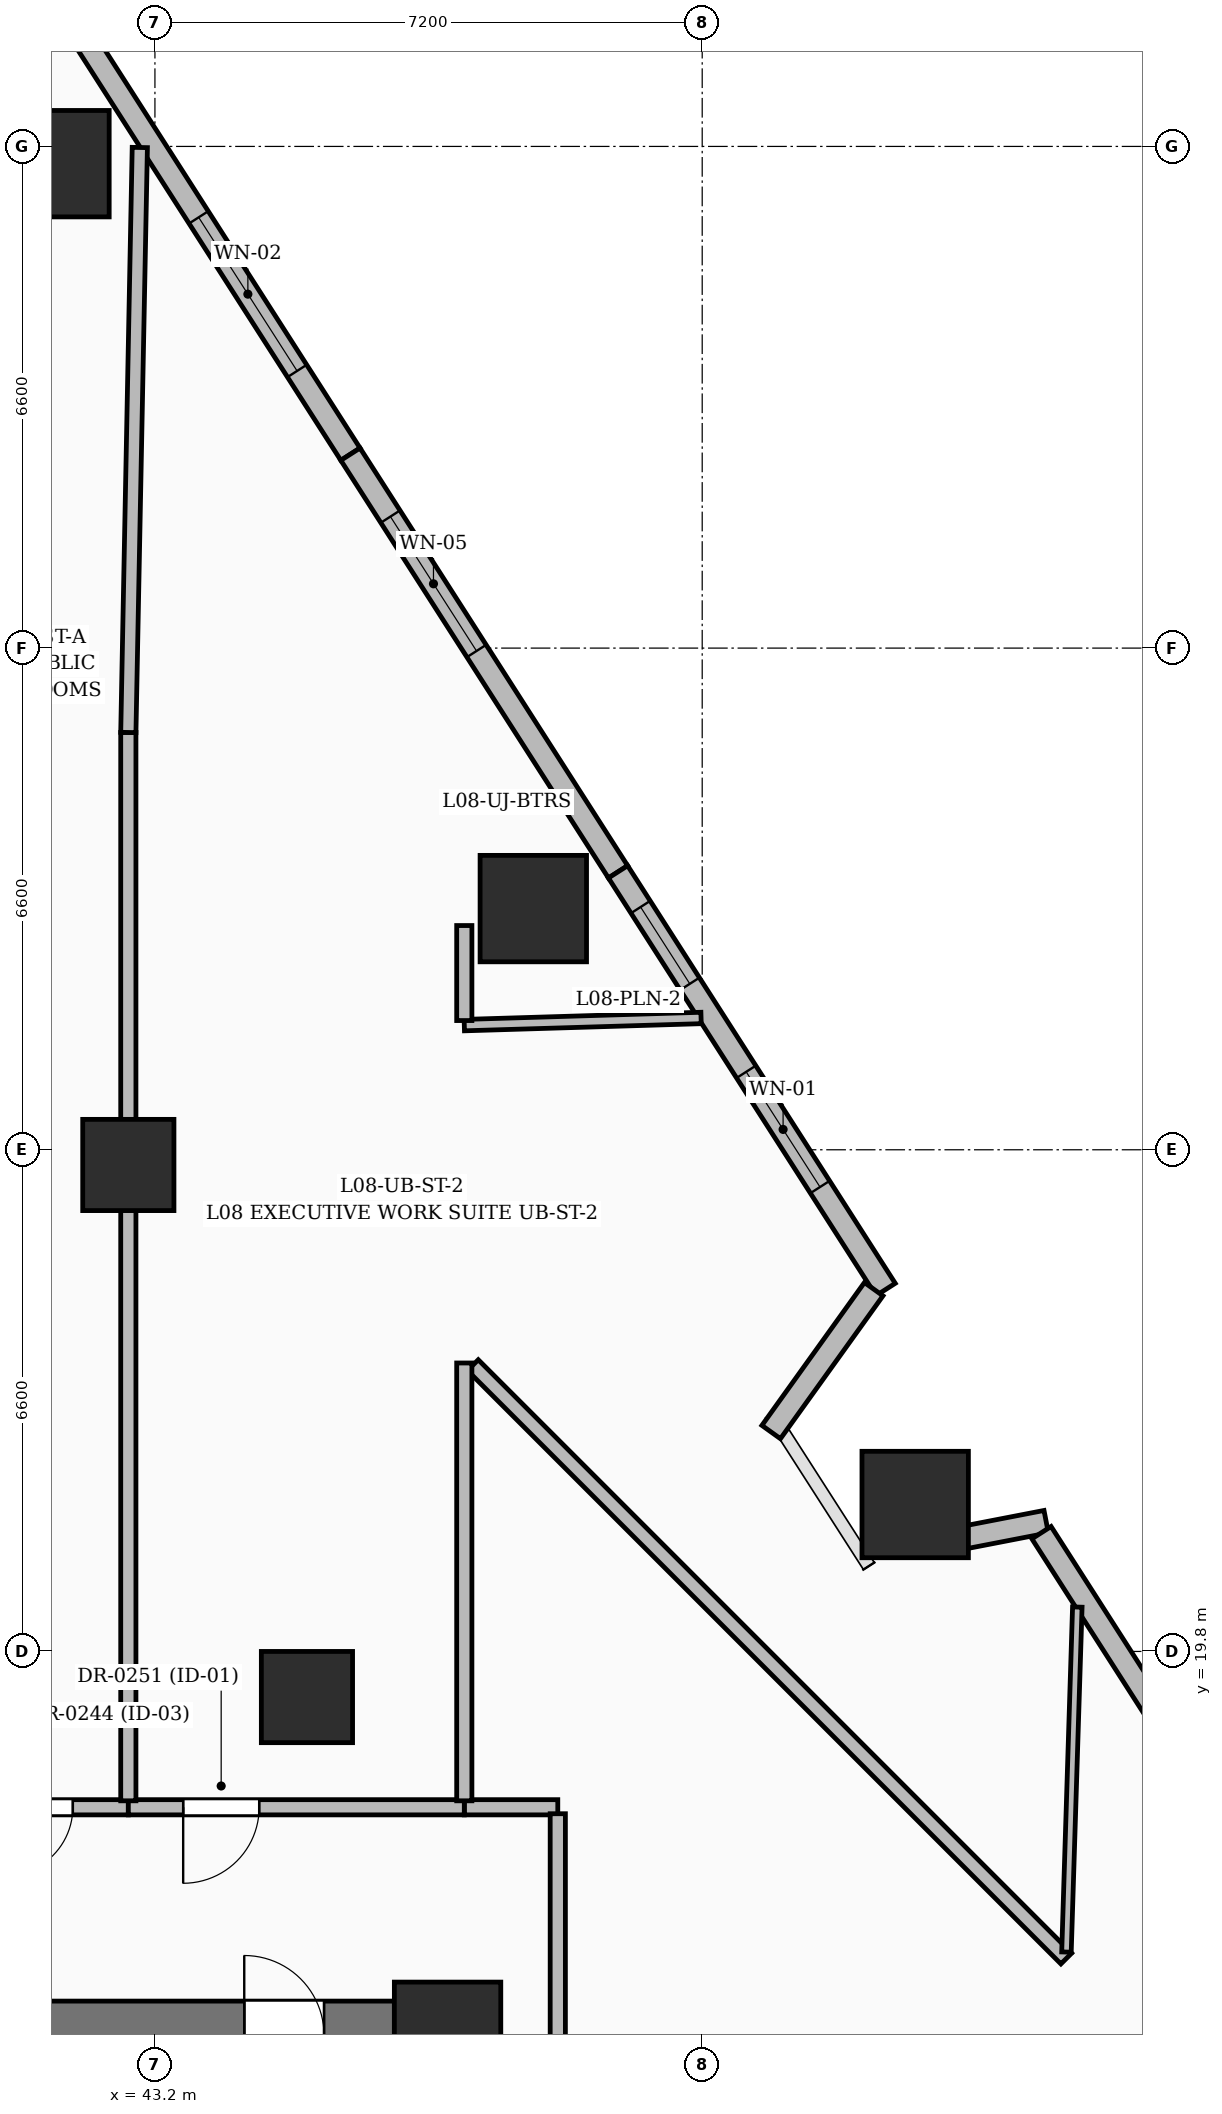
"""IFC4 building model, lengths in metres.
Left out: names, types, materials, properties, quantities, classifications, styles, units other than length and angle.
Written with IfcOpenShell. Run it as: python <this file> out.ifc"""

import sys

from ifc_helpers import new_model, si_unit, direction, frame, frame_2d, origin, origin_2d, place, context, subcontext, project, spatial, rectangle, extrude, element, fill, save


model = new_model("IFC4")
c1 = context("Model", 3, precision=1e-05, world=origin(), true_north=direction((0.0, 1.0)))
c2 = subcontext(c1, "Body", "Model", "MODEL_VIEW")
j1 = project(units=[si_unit("LENGTHUNIT", "METRE"), si_unit("PLANEANGLEUNIT", "RADIAN")], contexts=[c1])
p1 = place(None, origin())
s1 = spatial("IfcSite", under=j1, at=p1, CompositionType="ELEMENT")
p2 = place(p1, origin())
s2 = spatial("IfcBuilding", under=s1, at=p2, CompositionType="ELEMENT")
p3 = place(p2, frame((0.0, 0.0, 39.0)))
s3 = spatial("IfcBuildingStorey", under=s2, at=p3, CompositionType="ELEMENT", Elevation=39.0)
p4 = place(p3, frame((47.05, 14.75, 0.0), z_axis=(0.0, 0.0, 1.0), x_axis=(1.0, 0.0, 0.0)))
e1 = element("IfcColumn", 1, at=p4, inside=s3, PredefinedType="COLUMN", context=c2, shape_type="SweptSolid", body=[
    extrude(rectangle(XDim=1.4, YDim=1.4, at=origin_2d()), origin(), (0.0, 0.0, 1.0), 3.6),
])
for number, where, z_axis, x_axis in (
    (2, (45.2, 19.2, 0.0), (0.0, 0.0, 1.0), (1.0, 0.0, 0.0)),
    (3, (42.85, 26.2, 0.0), (0.0, 0.0, 1.0), (1.0, 0.0, 0.0)),
):
    element("IfcColumn", number, at=place(p3, frame(where, z_axis=z_axis, x_axis=x_axis)), inside=s3, PredefinedType="COLUMN", context=c2, shape_type="SweptSolid", body=[
        extrude(rectangle(XDim=1.2, YDim=1.2, at=origin_2d()), origin(), (0.0, 0.0, 1.0), 3.6),
    ])
p5 = place(p3, frame((35.85, 14.75, 0.0), z_axis=(0.0, 0.0, 1.0), x_axis=(1.0, 0.0, 0.0)))
e4 = element("IfcWall", 4, at=p5, inside=s3, PredefinedType="SHEAR", context=c2, shape_type="SweptSolid", body=[
    extrude(rectangle(XDim=10.5, YDim=0.9, at=frame_2d((5.25, 0.0))), origin(), (0.0, 0.0, 1.0), 3.6),
])
p6 = place(p5, frame((0.925, 0.0, 0.0)))
e5 = element("IfcOpeningElement", 5, at=p6, cuts=e4, PredefinedType="OPENING", context=c2, shape_type="SweptSolid", body=[
    extrude(rectangle(XDim=1.05, YDim=2.15, at=frame_2d((0.525, 1.075))), frame((0.0, 0.46, 0.0), z_axis=(0.0, -1.0, 0.0), x_axis=(1.0, 0.0, 0.0)), (0.0, 0.0, 1.0), 0.92),
])
p7 = place(p5, frame((8.525, 0.0, 0.0)))
e6 = element("IfcOpeningElement", 6, at=p7, cuts=e4, PredefinedType="OPENING", context=c2, shape_type="SweptSolid", body=[
    extrude(rectangle(XDim=1.05, YDim=2.15, at=frame_2d((0.525, 1.075))), frame((0.0, 0.46, 0.0), z_axis=(0.0, -1.0, 0.0), x_axis=(1.0, 0.0, 0.0)), (0.0, 0.0, 1.0), 0.92),
])
for number, where, z_axis, x_axis in (
    (7, (53.202, 21.733, 0.0), (0.0, 0.0, 1.0), (1.0, 0.0, 0.0)),
    (8, (48.178, 29.573, 0.0), (0.0, 0.0, 1.0), (1.0, 0.0, 0.0)),
    (9, (41.898, 39.373, 0.0), (0.0, 0.0, 1.0), (1.0, 0.0, 0.0)),
):
    element("IfcColumn", number, at=place(p3, frame(where, z_axis=z_axis, x_axis=x_axis)), inside=s3, PredefinedType="COLUMN", context=c2, shape_type="SweptSolid", body=[
        extrude(rectangle(XDim=1.4, YDim=1.4, at=origin_2d()), origin(), (0.0, 0.0, 1.0), 3.6),
    ])
p8 = place(p3, frame((42.251, 41.045, 0.0), z_axis=(0.0, 0.0, 1.0), x_axis=(0.539526045631, -0.841968910403, 0.0)))
e10 = element("IfcWall", 10, at=p8, inside=s3, PredefinedType="SOLIDWALL", context=c2, shape_type="SweptSolid", body=[
    extrude(rectangle(XDim=6.526, YDim=0.3, at=frame_2d((3.263, 0.0))), origin(), (0.0, 0.0, 1.0), 3.35),
])
p9 = place(p8, frame((2.825, 0.0, 0.6)))
e11 = element("IfcOpeningElement", 11, at=p9, cuts=e10, PredefinedType="OPENING", context=c2, shape_type="SweptSolid", body=[
    extrude(rectangle(XDim=2.4, YDim=2.1, at=frame_2d((1.2, 1.05))), frame((0.0, 0.16, 0.0), z_axis=(0.0, -1.0, 0.0), x_axis=(1.0, 0.0, 0.0)), (0.0, 0.0, 1.0), 0.32),
])
p10 = place(p3, frame((45.772, 35.551, 0.0), z_axis=(0.0, 0.0, 1.0), x_axis=(0.539526045631, -0.841968910403, 0.0)))
e12 = element("IfcWall", 12, at=p10, inside=s3, PredefinedType="SOLIDWALL", context=c2, shape_type="SweptSolid", body=[
    extrude(rectangle(XDim=6.526, YDim=0.3, at=frame_2d((3.263, 0.0))), origin(), (0.0, 0.0, 1.0), 3.35),
])
p11 = place(p10, frame((0.975, 0.0, 0.55)))
e13 = element("IfcOpeningElement", 13, at=p11, cuts=e12, PredefinedType="OPENING", context=c2, shape_type="SweptSolid", body=[
    extrude(rectangle(XDim=2.1, YDim=2.4, at=frame_2d((1.05, 1.2))), frame((0.0, 0.16, 0.0), z_axis=(0.0, -1.0, 0.0), x_axis=(1.0, 0.0, 0.0)), (0.0, 0.0, 1.0), 0.32),
])
p12 = place(p3, frame((49.293, 30.057, 0.0), z_axis=(0.0, 0.0, 1.0), x_axis=(0.539509050887, -0.84197980024, 0.0)))
e14 = element("IfcWall", 14, at=p12, inside=s3, PredefinedType="SOLIDWALL", context=c2, shape_type="SweptSolid", body=[
    extrude(rectangle(XDim=6.526, YDim=0.3, at=frame_2d((3.263, 0.0))), origin(), (0.0, 0.0, 1.0), 3.35),
])
p13 = place(p12, frame((3.125, 0.0, 0.6)))
e15 = element("IfcOpeningElement", 15, at=p13, cuts=e14, PredefinedType="OPENING", context=c2, shape_type="SweptSolid", body=[
    extrude(rectangle(XDim=1.8, YDim=2.1, at=frame_2d((0.9, 1.05))), frame((0.0, 0.16, 0.0), z_axis=(0.0, -1.0, 0.0), x_axis=(1.0, 0.0, 0.0)), (0.0, 0.0, 1.0), 0.32),
])
p14 = place(p12, frame((0.55, 0.0, 0.8)))
e16 = element("IfcOpeningElement", 16, at=p14, cuts=e14, PredefinedType="OPENING", context=c2, shape_type="SweptSolid", body=[
    extrude(rectangle(XDim=1.2, YDim=1.8, at=frame_2d((0.6, 0.9))), frame((0.0, 0.16, 0.0), z_axis=(0.0, -1.0, 0.0), x_axis=(1.0, 0.0, 0.0)), (0.0, 0.0, 1.0), 0.32),
])
p15 = place(p3, frame((52.656, 24.566, 0.0), z_axis=(0.0, 0.0, 1.0), x_axis=(-0.583053244013, -0.812433944789, 0.0)))
e17 = element("IfcWall", 17, at=p15, inside=s3, PredefinedType="SOLIDWALL", context=c2, shape_type="SweptSolid", body=[
    extrude(rectangle(XDim=2.314, YDim=0.3, at=frame_2d((1.157, 0.0))), origin(), (0.0, 0.0, 1.0), 2.375),
])
p16 = place(p3, frame((53.864, 21.302, 0.0), z_axis=(0.0, 0.0, 1.0), x_axis=(0.981752657473, 0.190162350493, 0.0)))
e18 = element("IfcWall", 18, at=p16, inside=s3, PredefinedType="SOLIDWALL", context=c2, shape_type="SweptSolid", body=[
    extrude(rectangle(XDim=1.081, YDim=0.3, at=frame_2d((0.541, 0.0))), origin(), (0.0, 0.0, 1.0), 2.375),
])
p17 = place(p3, frame((54.864, 21.363, 0.0), z_axis=(0.0, 0.0, 1.0), x_axis=(0.539525561028, -0.841969220932, 0.0)))
e19 = element("IfcWall", 19, at=p17, inside=s3, PredefinedType="SOLIDWALL", context=c2, shape_type="SweptSolid", body=[
    extrude(rectangle(XDim=5.872, YDim=0.3, at=frame_2d((2.936, 0.0))), origin(), (0.0, 0.0, 1.0), 3.35),
])
p18 = place(p17, frame((2.895, 0.0, 0.8)))
e20 = element("IfcOpeningElement", 20, at=p18, cuts=e19, PredefinedType="OPENING", context=c2, shape_type="SweptSolid", body=[
    extrude(rectangle(XDim=1.2, YDim=1.8, at=frame_2d((0.6, 0.9))), frame((0.0, 0.16, 0.0), z_axis=(0.0, -1.0, 0.0), x_axis=(1.0, 0.0, 0.0)), (0.0, 0.0, 1.0), 0.32),
])
p19 = place(p3, frame((48.5, 17.75, 0.0), z_axis=(0.0, 0.0, 1.0), x_axis=(-1.0, 0.0, 0.0)))
e21 = element("IfcWall", 21, at=p19, inside=s3, PredefinedType="PARTITIONING", context=c2, shape_type="SweptSolid", body=[
    extrude(rectangle(XDim=1.23, YDim=0.2, at=frame_2d((0.615, 0.0))), origin(), (0.0, 0.0, 1.0), 2.771),
])
p20 = place(p3, frame((42.85, 17.75, 0.0), z_axis=(0.0, 0.0, 1.0), x_axis=(-1.0, 0.0, 0.0)))
e22 = element("IfcWall", 22, at=p20, inside=s3, PredefinedType="PARTITIONING", context=c2, shape_type="SweptSolid", body=[
    extrude(rectangle(XDim=2.36, YDim=0.2, at=frame_2d((1.18, 0.0))), origin(), (0.0, 0.0, 1.0), 3.35),
])
p21 = place(p20, frame((0.73, 0.0, 0.0)))
e23 = element("IfcOpeningElement", 23, at=p21, cuts=e22, PredefinedType="OPENING", context=c2, shape_type="SweptSolid", body=[
    extrude(rectangle(XDim=0.9, YDim=2.1, at=frame_2d((0.45, 1.05))), frame((0.0, 0.11, 0.0), z_axis=(0.0, -1.0, 0.0), x_axis=(1.0, 0.0, 0.0)), (0.0, 0.0, 1.0), 0.22),
])
p22 = place(p3, frame((47.27, 17.75, 0.0), z_axis=(0.0, 0.0, 1.0), x_axis=(-1.0, 0.0, 0.0)))
e24 = element("IfcWall", 24, at=p22, inside=s3, PredefinedType="PARTITIONING", context=c2, shape_type="SweptSolid", body=[
    extrude(rectangle(XDim=4.42, YDim=0.2, at=frame_2d((2.21, 0.0))), origin(), (0.0, 0.0, 1.0), 2.309),
])
p23 = place(p22, frame((2.698, 0.0, 0.0)))
e25 = element("IfcOpeningElement", 25, at=p23, cuts=e24, PredefinedType="OPENING", context=c2, shape_type="SweptSolid", body=[
    extrude(rectangle(XDim=1.0, YDim=2.2, at=frame_2d((0.5, 1.1))), frame((0.0, 0.11, 0.0), z_axis=(0.0, -1.0, 0.0), x_axis=(1.0, 0.0, 0.0)), (0.0, 0.0, 1.0), 0.22),
])
p24 = place(p3, frame((55.19, 15.76, 0.0), z_axis=(0.0, 0.0, 1.0), x_axis=(-0.707106781187, 0.707106781187, 0.0)))
e26 = element("IfcWall", 26, at=p24, inside=s3, PredefinedType="PARTITIONING", context=c2, shape_type="SweptSolid", body=[
    extrude(rectangle(XDim=11.041, YDim=0.2, at=frame_2d((5.52, 0.0))), origin(), (0.0, 0.0, 1.0), 2.279),
])
p25 = place(p3, frame((47.27, 23.595, 0.0), z_axis=(0.0, 0.0, 1.0), x_axis=(0.0, -1.0, 0.0)))
e27 = element("IfcWall", 27, at=p25, inside=s3, PredefinedType="PARTITIONING", context=c2, shape_type="SweptSolid", body=[
    extrude(rectangle(XDim=5.76, YDim=0.2, at=frame_2d((2.88, 0.0))), origin(), (0.0, 0.0, 1.0), 2.771),
])
p26 = place(p3, frame((55.192, 15.845, 0.0), z_axis=(0.0, 0.0, 1.0), x_axis=(0.031449581736, 0.99950533956, 0.0)))
e28 = element("IfcWall", 28, at=p26, inside=s3, PredefinedType="PARTITIONING", context=c2, shape_type="SweptSolid", body=[
    extrude(rectangle(XDim=4.541, YDim=0.125, at=frame_2d((2.271, 0.0))), origin(), (0.0, 0.0, 1.0), 2.37),
])
p27 = place(p3, frame((50.385, 28.134, 0.0), z_axis=(0.0, 0.0, 1.0), x_axis=(-0.999545052024, -0.030161050633, 0.0)))
e29 = element("IfcWall", 29, at=p27, inside=s3, PredefinedType="PARTITIONING", context=c2, shape_type="SweptSolid", body=[
    extrude(rectangle(XDim=3.116, YDim=0.15, at=frame_2d((1.558, 0.0))), origin(), (0.0, 0.0, 1.0), 2.279),
])
p28 = place(p3, frame((47.27, 29.35, 0.0), z_axis=(0.0, 0.0, 1.0), x_axis=(0.0, -1.0, 0.0)))
e30 = element("IfcWall", 30, at=p28, inside=s3, PredefinedType="PARTITIONING", context=c2, shape_type="SweptSolid", body=[
    extrude(rectangle(XDim=1.25, YDim=0.2, at=frame_2d((0.625, 0.0))), origin(), (0.0, 0.0, 1.0), 3.35),
])
p29 = place(p3, frame((42.85, 17.835, 0.0), z_axis=(0.0, 0.0, 1.0), x_axis=(0.0, 1.0, 0.0)))
e31 = element("IfcWall", 31, at=p29, inside=s3, PredefinedType="PARTITIONING", context=c2, shape_type="SweptSolid", body=[
    extrude(rectangle(XDim=14.055, YDim=0.2, at=frame_2d((7.027, 0.0))), origin(), (0.0, 0.0, 1.0), 2.279),
])
p30 = place(p3, frame((42.85, 31.89, 0.0), z_axis=(0.0, 0.0, 1.0), x_axis=(0.019600966642, 0.999807882599, 0.0)))
e32 = element("IfcWall", 32, at=p30, inside=s3, PredefinedType="PARTITIONING", context=c2, shape_type="SweptSolid", body=[
    extrude(rectangle(XDim=7.698, YDim=0.2, at=frame_2d((3.849, 0.0))), origin(), (0.0, 0.0, 1.0), 2.37),
])
p31 = place(p3, frame((48.5, 14.285, 0.0), z_axis=(0.0, 0.0, 1.0), x_axis=(0.0, 1.0, 0.0)))
e33 = element("IfcWall", 33, at=p31, inside=s3, PredefinedType="PARTITIONING", context=c2, shape_type="SweptSolid", body=[
    extrude(rectangle(XDim=3.38, YDim=0.2, at=frame_2d((1.69, 0.0))), origin(), (0.0, 0.0, 1.0), 2.279),
])
p32 = place(p9, origin())
e34 = element("IfcWindow", 34, at=p32, inside=s3, PartitioningType="SINGLE_PANEL", PredefinedType="WINDOW", context=c2, shape_type="SweptSolid", body=[
    extrude(rectangle(XDim=2.4, YDim=2.1, at=frame_2d((1.2, 1.05))), frame((0.0, 0.03, 0.0), z_axis=(0.0, -1.0, 0.0), x_axis=(1.0, 0.0, 0.0)), (0.0, 0.0, 1.0), 0.06),
])
fill(e11, e34)
p33 = place(p11, origin())
e35 = element("IfcWindow", 35, at=p33, inside=s3, PartitioningType="SINGLE_PANEL", PredefinedType="WINDOW", context=c2, shape_type="SweptSolid", body=[
    extrude(rectangle(XDim=2.1, YDim=2.4, at=frame_2d((1.05, 1.2))), frame((0.0, 0.03, 0.0), z_axis=(0.0, -1.0, 0.0), x_axis=(1.0, 0.0, 0.0)), (0.0, 0.0, 1.0), 0.06),
])
fill(e13, e35)
p34 = place(p13, origin())
e36 = element("IfcWindow", 36, at=p34, inside=s3, PartitioningType="SINGLE_PANEL", PredefinedType="WINDOW", context=c2, shape_type="SweptSolid", body=[
    extrude(rectangle(XDim=1.8, YDim=2.1, at=frame_2d((0.9, 1.05))), frame((0.0, 0.03, 0.0), z_axis=(0.0, -1.0, 0.0), x_axis=(1.0, 0.0, 0.0)), (0.0, 0.0, 1.0), 0.06),
])
fill(e15, e36)
p35 = place(p14, origin())
e37 = element("IfcWindow", 37, at=p35, inside=s3, PartitioningType="SINGLE_PANEL", PredefinedType="WINDOW", context=c2, shape_type="SweptSolid", body=[
    extrude(rectangle(XDim=1.2, YDim=1.8, at=frame_2d((0.6, 0.9))), frame((0.0, 0.03, 0.0), z_axis=(0.0, -1.0, 0.0), x_axis=(1.0, 0.0, 0.0)), (0.0, 0.0, 1.0), 0.06),
])
fill(e16, e37)
p36 = place(p7, origin())
e38 = element("IfcDoor", 38, at=p36, inside=s3, OperationType="SINGLE_SWING_LEFT", PredefinedType="DOOR", context=c2, shape_type="SweptSolid", body=[
    extrude(rectangle(XDim=1.05, YDim=2.15, at=frame_2d((0.525, 1.075))), frame((0.0, 0.025, 0.0), z_axis=(0.0, -1.0, 0.0), x_axis=(1.0, 0.0, 0.0)), (0.0, 0.0, 1.0), 0.05),
])
fill(e6, e38)
p37 = place(p21, origin())
e39 = element("IfcDoor", 39, at=p37, inside=s3, OperationType="SINGLE_SWING_RIGHT", PredefinedType="DOOR", context=c2, shape_type="SweptSolid", body=[
    extrude(rectangle(XDim=0.9, YDim=2.1, at=frame_2d((0.45, 1.05))), frame((0.0, 0.025, 0.0), z_axis=(0.0, -1.0, 0.0), x_axis=(1.0, 0.0, 0.0)), (0.0, 0.0, 1.0), 0.05),
])
fill(e23, e39)
p38 = place(p23, origin())
e40 = element("IfcDoor", 40, at=p38, inside=s3, OperationType="SINGLE_SWING_RIGHT", PredefinedType="DOOR", context=c2, shape_type="SweptSolid", body=[
    extrude(rectangle(XDim=1.0, YDim=2.2, at=frame_2d((0.5, 1.1))), frame((0.0, 0.025, 0.0), z_axis=(0.0, -1.0, 0.0), x_axis=(1.0, 0.0, 0.0)), (0.0, 0.0, 1.0), 0.05),
])
fill(e25, e40)
save(model, sys.argv[1])
